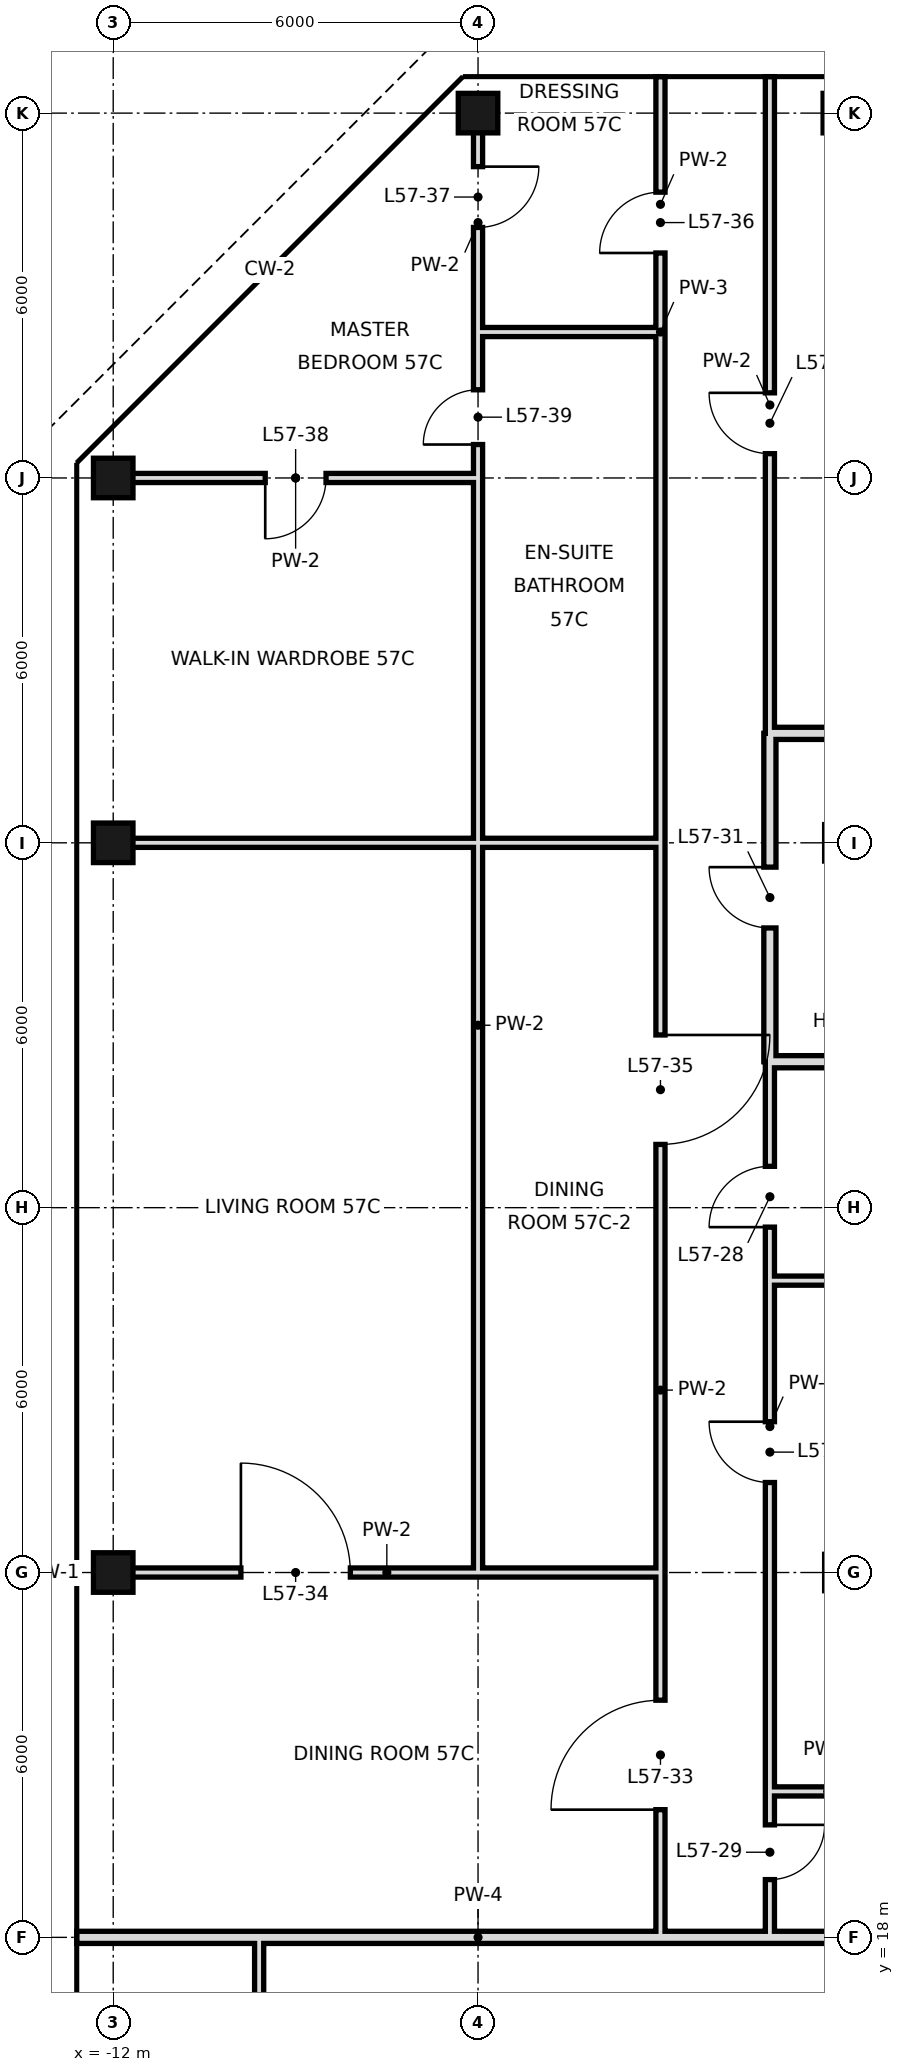
"""IFC4 building model, lengths in metres.
Left out: names, types, materials, properties, quantities, classifications, styles, units other than length and angle.
Written with IfcOpenShell. Run it as: python <this file> out.ifc"""

import sys

from ifc_helpers import new_model, si_unit, direction, frame, frame_2d, origin, origin_2d, place, context, subcontext, project, spatial, rectangle, hollow_rectangle, extrude, element, fill, save


model = new_model("IFC4")
c1 = context("Model", 3, precision=1e-05, world=origin(), true_north=direction((0.0, 1.0)))
c2 = subcontext(c1, "Body", "Model", "MODEL_VIEW")
j1 = project(units=[si_unit("LENGTHUNIT", "METRE"), si_unit("PLANEANGLEUNIT", "RADIAN")], contexts=[c1])
p1 = place(None, origin())
s1 = spatial("IfcSite", under=j1, at=p1, CompositionType="ELEMENT")
p2 = place(p1, origin())
s2 = spatial("IfcBuilding", under=s1, at=p2, CompositionType="ELEMENT")
p3 = place(p2, frame((0.0, 0.0, 243.2)))
s3 = spatial("IfcBuildingStorey", under=s2, at=p3, CompositionType="ELEMENT", Elevation=243.2)
for number, where, z_axis, x_axis in (
    (1, (-12.0, 24.0, 0.0), (0.0, 0.0, 1.0), (1.0, 0.0, 0.0)),
    (2, (-12.0, 36.0, 0.0), (0.0, 0.0, 1.0), (1.0, 0.0, 0.0)),
    (3, (-12.0, 42.0, 0.0), (0.0, 0.0, 1.0), (1.0, 0.0, 0.0)),
    (4, (-6.0, 48.0, 0.0), (0.0, 0.0, 1.0), (1.0, 0.0, 0.0)),
    (5, (0.0, 48.0, 0.0), (0.0, 0.0, 1.0), (1.0, 0.0, 0.0)),
):
    element("IfcColumn", number, at=place(p3, frame(where, z_axis=z_axis, x_axis=x_axis)), inside=s3, PredefinedType="COLUMN", context=c2, shape_type="SweptSolid", body=[
        extrude(hollow_rectangle(XDim=0.65, YDim=0.65, WallThickness=0.032, at=origin_2d()), origin(), (0.0, 0.0, 1.0), 3.6),
    ])
p4 = place(p3, frame((-1.2, 32.4, 0.0), z_axis=(0.0, 0.0, 1.0), x_axis=(0.0, 1.0, 0.0)))
e6 = element("IfcWall", 6, at=p4, inside=s3, PredefinedType="SOLIDWALL", context=c2, shape_type="SweptSolid", body=[
    extrude(rectangle(XDim=5.4, YDim=0.2, at=frame_2d((2.7, 0.0))), origin(), (0.0, 0.0, 1.0), 2.72),
])
p5 = place(p4, frame((2.2, 0.0, 0.0)))
e7 = element("IfcOpeningElement", 7, at=p5, cuts=e6, PredefinedType="OPENING", context=c2, shape_type="SweptSolid", body=[
    extrude(rectangle(XDim=1.0, YDim=2.4, at=frame_2d((0.5, 1.2))), frame((0.0, 0.11, 0.0), z_axis=(0.0, -1.0, 0.0), x_axis=(1.0, 0.0, 0.0)), (0.0, 0.0, 1.0), 0.22),
])
p6 = place(p3, frame((-1.2, 20.4, 0.0), z_axis=(0.0, 0.0, 1.0), x_axis=(0.0, 1.0, 0.0)))
e8 = element("IfcWall", 8, at=p6, inside=s3, PredefinedType="PARTITIONING", context=c2, shape_type="SweptSolid", body=[
    extrude(rectangle(XDim=12.0, YDim=0.15, at=frame_2d((6.0, 0.0))), origin(), (0.0, 0.0, 1.0), 3.42),
])
p7 = place(p6, frame((9.28, 0.0, 0.0)))
e9 = element("IfcOpeningElement", 9, at=p7, cuts=e8, PredefinedType="OPENING", context=c2, shape_type="SweptSolid", body=[
    extrude(rectangle(XDim=1.0, YDim=2.4, at=frame_2d((0.5, 1.2))), frame((0.0, 0.085, 0.0), z_axis=(0.0, -1.0, 0.0), x_axis=(1.0, 0.0, 0.0)), (0.0, 0.0, 1.0), 0.17),
])
p8 = place(p6, frame((5.08, 0.0, 0.0)))
e10 = element("IfcOpeningElement", 10, at=p8, cuts=e8, PredefinedType="OPENING", context=c2, shape_type="SweptSolid", body=[
    extrude(rectangle(XDim=1.0, YDim=2.4, at=frame_2d((0.5, 1.2))), frame((0.0, 0.085, 0.0), z_axis=(0.0, -1.0, 0.0), x_axis=(1.0, 0.0, 0.0)), (0.0, 0.0, 1.0), 0.17),
])
p9 = place(p3, frame((-1.2, 37.8, 0.0), z_axis=(0.0, 0.0, 1.0), x_axis=(0.0, 1.0, 0.0)))
e11 = element("IfcWall", 11, at=p9, inside=s3, PredefinedType="PARTITIONING", context=c2, shape_type="SweptSolid", body=[
    extrude(rectangle(XDim=10.8, YDim=0.15, at=frame_2d((5.4, 0.0))), origin(), (0.0, 0.0, 1.0), 3.42),
])
p10 = place(p9, frame((4.6, 0.0, 0.0)))
e12 = element("IfcOpeningElement", 12, at=p10, cuts=e11, PredefinedType="OPENING", context=c2, shape_type="SweptSolid", body=[
    extrude(rectangle(XDim=1.0, YDim=2.4, at=frame_2d((0.5, 1.2))), frame((0.0, 0.085, 0.0), z_axis=(0.0, -1.0, 0.0), x_axis=(1.0, 0.0, 0.0)), (0.0, 0.0, 1.0), 0.17),
])
p11 = place(p3, frame((-1.2, 18.0, 0.0), z_axis=(0.0, 0.0, 1.0), x_axis=(0.0, 1.0, 0.0)))
e13 = element("IfcWall", 13, at=p11, inside=s3, PredefinedType="PARTITIONING", context=c2, shape_type="SweptSolid", body=[
    extrude(rectangle(XDim=2.4, YDim=0.15, at=frame_2d((1.2, 0.0))), origin(), (0.0, 0.0, 1.0), 3.42),
])
p12 = place(p11, frame((0.95, 0.0, 0.0)))
e14 = element("IfcOpeningElement", 14, at=p12, cuts=e13, PredefinedType="OPENING", context=c2, shape_type="SweptSolid", body=[
    extrude(rectangle(XDim=0.9, YDim=2.4, at=frame_2d((0.45, 1.2))), frame((0.0, 0.085, 0.0), z_axis=(0.0, -1.0, 0.0), x_axis=(1.0, 0.0, 0.0)), (0.0, 0.0, 1.0), 0.17),
])
p13 = place(p3, frame((-3.0, 18.0, 0.0), z_axis=(0.0, 0.0, 1.0), x_axis=(0.0, 1.0, 0.0)))
e15 = element("IfcWall", 15, at=p13, inside=s3, PredefinedType="PARTITIONING", context=c2, shape_type="SweptSolid", body=[
    extrude(rectangle(XDim=18.0, YDim=0.15, at=frame_2d((9.0, 0.0))), origin(), (0.0, 0.0, 1.0), 3.42),
])
p14 = place(p13, frame((2.1, 0.0, 0.0)))
e16 = element("IfcOpeningElement", 16, at=p14, cuts=e15, PredefinedType="OPENING", context=c2, shape_type="SweptSolid", body=[
    extrude(rectangle(XDim=1.8, YDim=2.4, at=frame_2d((0.9, 1.2))), frame((0.0, 0.085, 0.0), z_axis=(0.0, -1.0, 0.0), x_axis=(1.0, 0.0, 0.0)), (0.0, 0.0, 1.0), 0.17),
])
p15 = place(p13, frame((13.04, 0.0, 0.0)))
e17 = element("IfcOpeningElement", 17, at=p15, cuts=e15, PredefinedType="OPENING", context=c2, shape_type="SweptSolid", body=[
    extrude(rectangle(XDim=1.8, YDim=2.4, at=frame_2d((0.9, 1.2))), frame((0.0, 0.085, 0.0), z_axis=(0.0, -1.0, 0.0), x_axis=(1.0, 0.0, 0.0)), (0.0, 0.0, 1.0), 0.17),
])
p16 = place(p3, frame((-3.0, 44.4, 0.0), z_axis=(0.0, 0.0, 1.0), x_axis=(0.0, 1.0, 0.0)))
e18 = element("IfcWall", 18, at=p16, inside=s3, PredefinedType="PARTITIONING", context=c2, shape_type="SweptSolid", body=[
    extrude(rectangle(XDim=4.2, YDim=0.15, at=frame_2d((2.1, 0.0))), origin(), (0.0, 0.0, 1.0), 3.42),
])
p17 = place(p16, frame((1.3, 0.0, 0.0)))
e19 = element("IfcOpeningElement", 19, at=p17, cuts=e18, PredefinedType="OPENING", context=c2, shape_type="SweptSolid", body=[
    extrude(rectangle(XDim=1.0, YDim=2.4, at=frame_2d((0.5, 1.2))), frame((0.0, 0.085, 0.0), z_axis=(0.0, -1.0, 0.0), x_axis=(1.0, 0.0, 0.0)), (0.0, 0.0, 1.0), 0.17),
])
p18 = place(p3, frame((-3.0, 36.0, 0.0), z_axis=(0.0, 0.0, 1.0), x_axis=(0.0, 1.0, 0.0)))
e20 = element("IfcWall", 20, at=p18, inside=s3, PredefinedType="PARTITIONING", context=c2, shape_type="SweptSolid", body=[
    extrude(rectangle(XDim=8.4, YDim=0.15, at=frame_2d((4.2, 0.0))), origin(), (0.0, 0.0, 1.0), 3.42),
])
p19 = place(p3, frame((-6.0, 24.0, 0.0), z_axis=(0.0, 0.0, 1.0), x_axis=(0.0, 1.0, 0.0)))
e21 = element("IfcWall", 21, at=p19, inside=s3, PredefinedType="PARTITIONING", context=c2, shape_type="SweptSolid", body=[
    extrude(rectangle(XDim=12.0, YDim=0.15, at=frame_2d((6.0, 0.0))), origin(), (0.0, 0.0, 1.0), 3.42),
])
p20 = place(p3, frame((-6.0, 44.4, 0.0), z_axis=(0.0, 0.0, 1.0), x_axis=(0.0, 1.0, 0.0)))
e22 = element("IfcWall", 22, at=p20, inside=s3, PredefinedType="PARTITIONING", context=c2, shape_type="SweptSolid", body=[
    extrude(rectangle(XDim=3.6, YDim=0.15, at=frame_2d((1.8, 0.0))), origin(), (0.0, 0.0, 1.0), 3.42),
])
p21 = place(p20, frame((1.72, 0.0, 0.0)))
e23 = element("IfcOpeningElement", 23, at=p21, cuts=e22, PredefinedType="OPENING", context=c2, shape_type="SweptSolid", body=[
    extrude(rectangle(XDim=1.0, YDim=2.4, at=frame_2d((0.5, 1.2))), frame((0.0, 0.085, 0.0), z_axis=(0.0, -1.0, 0.0), x_axis=(1.0, 0.0, 0.0)), (0.0, 0.0, 1.0), 0.17),
])
p22 = place(p3, frame((-6.0, 36.0, 0.0), z_axis=(0.0, 0.0, 1.0), x_axis=(0.0, 1.0, 0.0)))
e24 = element("IfcWall", 24, at=p22, inside=s3, PredefinedType="PARTITIONING", context=c2, shape_type="SweptSolid", body=[
    extrude(rectangle(XDim=8.4, YDim=0.15, at=frame_2d((4.2, 0.0))), origin(), (0.0, 0.0, 1.0), 3.42),
])
p23 = place(p22, frame((6.55, 0.0, 0.0)))
e25 = element("IfcOpeningElement", 25, at=p23, cuts=e24, PredefinedType="OPENING", context=c2, shape_type="SweptSolid", body=[
    extrude(rectangle(XDim=0.9, YDim=2.4, at=frame_2d((0.45, 1.2))), frame((0.0, 0.085, 0.0), z_axis=(0.0, -1.0, 0.0), x_axis=(1.0, 0.0, 0.0)), (0.0, 0.0, 1.0), 0.17),
])
p24 = place(p3, frame((-9.6, 10.8, 0.0), z_axis=(0.0, 0.0, 1.0), x_axis=(0.0, 1.0, 0.0)))
e26 = element("IfcWall", 26, at=p24, inside=s3, PredefinedType="PARTITIONING", context=c2, shape_type="SweptSolid", body=[
    extrude(rectangle(XDim=7.2, YDim=0.15, at=frame_2d((3.6, 0.0))), origin(), (0.0, 0.0, 1.0), 3.42),
])
p25 = place(p3, frame((-12.6, 18.0, 0.0), z_axis=(0.0, 0.0, 1.0), x_axis=(1.0, 0.0, 0.0)))
e27 = element("IfcWall", 27, at=p25, inside=s3, PredefinedType="SOLIDWALL", context=c2, shape_type="SweptSolid", body=[
    extrude(rectangle(XDim=13.2, YDim=0.2, at=frame_2d((6.6, 0.0))), origin(), (0.0, 0.0, 1.0), 2.72),
])
p26 = place(p3, frame((-1.2, 20.4, 0.0), z_axis=(0.0, 0.0, 1.0), x_axis=(1.0, 0.0, 0.0)))
e28 = element("IfcWall", 28, at=p26, inside=s3, PredefinedType="PARTITIONING", context=c2, shape_type="SweptSolid", body=[
    extrude(rectangle(XDim=4.3, YDim=0.15, at=frame_2d((2.15, 0.0))), origin(), (0.0, 0.0, 1.0), 3.42),
])
p27 = place(p3, frame((-12.0, 24.0, 0.0), z_axis=(0.0, 0.0, 1.0), x_axis=(1.0, 0.0, 0.0)))
e29 = element("IfcWall", 29, at=p27, inside=s3, PredefinedType="PARTITIONING", context=c2, shape_type="SweptSolid", body=[
    extrude(rectangle(XDim=9.0, YDim=0.15, at=frame_2d((4.5, 0.0))), origin(), (0.0, 0.0, 1.0), 2.72),
])
p28 = place(p27, frame((2.1, 0.0, 0.0)))
e30 = element("IfcOpeningElement", 30, at=p28, cuts=e29, PredefinedType="OPENING", context=c2, shape_type="SweptSolid", body=[
    extrude(rectangle(XDim=1.8, YDim=2.4, at=frame_2d((0.9, 1.2))), frame((0.0, 0.085, 0.0), z_axis=(0.0, -1.0, 0.0), x_axis=(1.0, 0.0, 0.0)), (0.0, 0.0, 1.0), 0.17),
])
p29 = place(p3, frame((-1.2, 28.8, 0.0), z_axis=(0.0, 0.0, 1.0), x_axis=(1.0, 0.0, 0.0)))
e31 = element("IfcWall", 31, at=p29, inside=s3, PredefinedType="PARTITIONING", context=c2, shape_type="SweptSolid", body=[
    extrude(rectangle(XDim=4.3, YDim=0.15, at=frame_2d((2.15, 0.0))), origin(), (0.0, 0.0, 1.0), 3.42),
])
p30 = place(p3, frame((-1.2, 32.4, 0.0), z_axis=(0.0, 0.0, 1.0), x_axis=(1.0, 0.0, 0.0)))
e32 = element("IfcWall", 32, at=p30, inside=s3, PredefinedType="SOLIDWALL", context=c2, shape_type="SweptSolid", body=[
    extrude(rectangle(XDim=4.3, YDim=0.2, at=frame_2d((2.15, 0.0))), origin(), (0.0, 0.0, 1.0), 2.72),
])
p31 = place(p3, frame((-12.0, 36.0, 0.0), z_axis=(0.0, 0.0, 1.0), x_axis=(1.0, 0.0, 0.0)))
e33 = element("IfcWall", 33, at=p31, inside=s3, PredefinedType="PARTITIONING", context=c2, shape_type="SweptSolid", body=[
    extrude(rectangle(XDim=6.0, YDim=0.15, at=frame_2d((3.0, 0.0))), origin(), (0.0, 0.0, 1.0), 2.72),
])
p32 = place(p3, frame((-6.0, 36.0, 0.0), z_axis=(0.0, 0.0, 1.0), x_axis=(1.0, 0.0, 0.0)))
e34 = element("IfcWall", 34, at=p32, inside=s3, PredefinedType="PARTITIONING", context=c2, shape_type="SweptSolid", body=[
    extrude(rectangle(XDim=3.0, YDim=0.15, at=frame_2d((1.5, 0.0))), origin(), (0.0, 0.0, 1.0), 2.72),
])
p33 = place(p3, frame((-1.2, 37.8, 0.0), z_axis=(0.0, 0.0, 1.0), x_axis=(1.0, 0.0, 0.0)))
e35 = element("IfcWall", 35, at=p33, inside=s3, PredefinedType="SOLIDWALL", context=c2, shape_type="SweptSolid", body=[
    extrude(rectangle(XDim=4.3, YDim=0.2, at=frame_2d((2.15, 0.0))), origin(), (0.0, 0.0, 1.0), 2.72),
])
p34 = place(p3, frame((-12.0, 42.0, 0.0), z_axis=(0.0, 0.0, 1.0), x_axis=(1.0, 0.0, 0.0)))
e36 = element("IfcWall", 36, at=p34, inside=s3, PredefinedType="PARTITIONING", context=c2, shape_type="SweptSolid", body=[
    extrude(rectangle(XDim=6.0, YDim=0.15, at=frame_2d((3.0, 0.0))), origin(), (0.0, 0.0, 1.0), 2.72),
])
p35 = place(p34, frame((2.5, 0.0, 0.0)))
e37 = element("IfcOpeningElement", 37, at=p35, cuts=e36, PredefinedType="OPENING", context=c2, shape_type="SweptSolid", body=[
    extrude(rectangle(XDim=1.0, YDim=2.4, at=frame_2d((0.5, 1.2))), frame((0.0, 0.085, 0.0), z_axis=(0.0, -1.0, 0.0), x_axis=(1.0, 0.0, 0.0)), (0.0, 0.0, 1.0), 0.17),
])
p36 = place(p3, frame((-6.0, 44.4, 0.0), z_axis=(0.0, 0.0, 1.0), x_axis=(1.0, 0.0, 0.0)))
e38 = element("IfcWall", 38, at=p36, inside=s3, PredefinedType="PARTITIONING", context=c2, shape_type="SweptSolid", body=[
    extrude(rectangle(XDim=3.0, YDim=0.15, at=frame_2d((1.5, 0.0))), origin(), (0.0, 0.0, 1.0), 3.42),
])
p37 = place(p7, origin())
e39 = element("IfcDoor", 39, at=p37, inside=s3, OperationType="SINGLE_SWING_LEFT", PredefinedType="DOOR", context=c2, shape_type="SweptSolid", body=[
    extrude(rectangle(XDim=1.0, YDim=2.4, at=frame_2d((0.5, 1.2))), frame((0.0, 0.025, 0.0), z_axis=(0.0, -1.0, 0.0), x_axis=(1.0, 0.0, 0.0)), (0.0, 0.0, 1.0), 0.05),
])
fill(e9, e39)
p38 = place(p12, origin())
e40 = element("IfcDoor", 40, at=p38, inside=s3, OperationType="SINGLE_SWING_RIGHT", PredefinedType="DOOR", context=c2, shape_type="SweptSolid", body=[
    extrude(rectangle(XDim=0.9, YDim=2.4, at=frame_2d((0.45, 1.2))), frame((0.0, 0.025, 0.0), z_axis=(0.0, -1.0, 0.0), x_axis=(1.0, 0.0, 0.0)), (0.0, 0.0, 1.0), 0.05),
])
fill(e14, e40)
p39 = place(p8, frame((1.0, 0.0, 0.0), z_axis=(0.0, 0.0, 1.0), x_axis=(-1.0, 0.0, 0.0)))
e41 = element("IfcDoor", 41, at=p39, inside=s3, OperationType="SINGLE_SWING_LEFT", PredefinedType="DOOR", context=c2, shape_type="SweptSolid", body=[
    extrude(rectangle(XDim=1.0, YDim=2.4, at=frame_2d((0.5, 1.2))), frame((0.0, 0.025, 0.0), z_axis=(0.0, -1.0, 0.0), x_axis=(1.0, 0.0, 0.0)), (0.0, 0.0, 1.0), 0.05),
])
fill(e10, e41)
p40 = place(p5, frame((1.0, 0.0, 0.0), z_axis=(0.0, 0.0, 1.0), x_axis=(-1.0, 0.0, 0.0)))
e42 = element("IfcDoor", 42, at=p40, inside=s3, OperationType="SINGLE_SWING_LEFT", PredefinedType="DOOR", context=c2, shape_type="SweptSolid", body=[
    extrude(rectangle(XDim=1.0, YDim=2.4, at=frame_2d((0.5, 1.2))), frame((0.0, 0.025, 0.0), z_axis=(0.0, -1.0, 0.0), x_axis=(1.0, 0.0, 0.0)), (0.0, 0.0, 1.0), 0.05),
])
fill(e7, e42)
p41 = place(p10, frame((1.0, 0.0, 0.0), z_axis=(0.0, 0.0, 1.0), x_axis=(-1.0, 0.0, 0.0)))
e43 = element("IfcDoor", 43, at=p41, inside=s3, OperationType="SINGLE_SWING_LEFT", PredefinedType="DOOR", context=c2, shape_type="SweptSolid", body=[
    extrude(rectangle(XDim=1.0, YDim=2.4, at=frame_2d((0.5, 1.2))), frame((0.0, 0.025, 0.0), z_axis=(0.0, -1.0, 0.0), x_axis=(1.0, 0.0, 0.0)), (0.0, 0.0, 1.0), 0.05),
])
fill(e12, e43)
p42 = place(p14, origin())
e44 = element("IfcDoor", 44, at=p42, inside=s3, OperationType="SINGLE_SWING_LEFT", PredefinedType="DOOR", context=c2, shape_type="SweptSolid", body=[
    extrude(rectangle(XDim=1.8, YDim=2.4, at=frame_2d((0.9, 1.2))), frame((0.0, 0.025, 0.0), z_axis=(0.0, -1.0, 0.0), x_axis=(1.0, 0.0, 0.0)), (0.0, 0.0, 1.0), 0.05),
])
fill(e16, e44)
p43 = place(p28, origin())
e45 = element("IfcDoor", 45, at=p43, inside=s3, OperationType="SINGLE_SWING_LEFT", PredefinedType="DOOR", context=c2, shape_type="SweptSolid", body=[
    extrude(rectangle(XDim=1.8, YDim=2.4, at=frame_2d((0.9, 1.2))), frame((0.0, 0.025, 0.0), z_axis=(0.0, -1.0, 0.0), x_axis=(1.0, 0.0, 0.0)), (0.0, 0.0, 1.0), 0.05),
])
fill(e30, e45)
p44 = place(p15, origin())
e46 = element("IfcDoor", 46, at=p44, inside=s3, OperationType="SINGLE_SWING_RIGHT", PredefinedType="DOOR", context=c2, shape_type="SweptSolid", body=[
    extrude(rectangle(XDim=1.8, YDim=2.4, at=frame_2d((0.9, 1.2))), frame((0.0, 0.025, 0.0), z_axis=(0.0, -1.0, 0.0), x_axis=(1.0, 0.0, 0.0)), (0.0, 0.0, 1.0), 0.05),
])
fill(e17, e46)
p45 = place(p17, origin())
e47 = element("IfcDoor", 47, at=p45, inside=s3, OperationType="SINGLE_SWING_LEFT", PredefinedType="DOOR", context=c2, shape_type="SweptSolid", body=[
    extrude(rectangle(XDim=1.0, YDim=2.4, at=frame_2d((0.5, 1.2))), frame((0.0, 0.025, 0.0), z_axis=(0.0, -1.0, 0.0), x_axis=(1.0, 0.0, 0.0)), (0.0, 0.0, 1.0), 0.05),
])
fill(e19, e47)
p46 = place(p21, origin())
e48 = element("IfcDoor", 48, at=p46, inside=s3, OperationType="SINGLE_SWING_RIGHT", PredefinedType="DOOR", context=c2, shape_type="SweptSolid", body=[
    extrude(rectangle(XDim=1.0, YDim=2.4, at=frame_2d((0.5, 1.2))), frame((0.0, 0.025, 0.0), z_axis=(0.0, -1.0, 0.0), x_axis=(1.0, 0.0, 0.0)), (0.0, 0.0, 1.0), 0.05),
])
fill(e23, e48)
p47 = place(p35, frame((1.0, 0.0, 0.0), z_axis=(0.0, 0.0, 1.0), x_axis=(-1.0, 0.0, 0.0)))
e49 = element("IfcDoor", 49, at=p47, inside=s3, OperationType="SINGLE_SWING_RIGHT", PredefinedType="DOOR", context=c2, shape_type="SweptSolid", body=[
    extrude(rectangle(XDim=1.0, YDim=2.4, at=frame_2d((0.5, 1.2))), frame((0.0, 0.025, 0.0), z_axis=(0.0, -1.0, 0.0), x_axis=(1.0, 0.0, 0.0)), (0.0, 0.0, 1.0), 0.05),
])
fill(e37, e49)
p48 = place(p23, origin())
e50 = element("IfcDoor", 50, at=p48, inside=s3, OperationType="SINGLE_SWING_LEFT", PredefinedType="DOOR", context=c2, shape_type="SweptSolid", body=[
    extrude(rectangle(XDim=0.9, YDim=2.4, at=frame_2d((0.45, 1.2))), frame((0.0, 0.025, 0.0), z_axis=(0.0, -1.0, 0.0), x_axis=(1.0, 0.0, 0.0)), (0.0, 0.0, 1.0), 0.05),
])
fill(e25, e50)
save(model, sys.argv[1])
